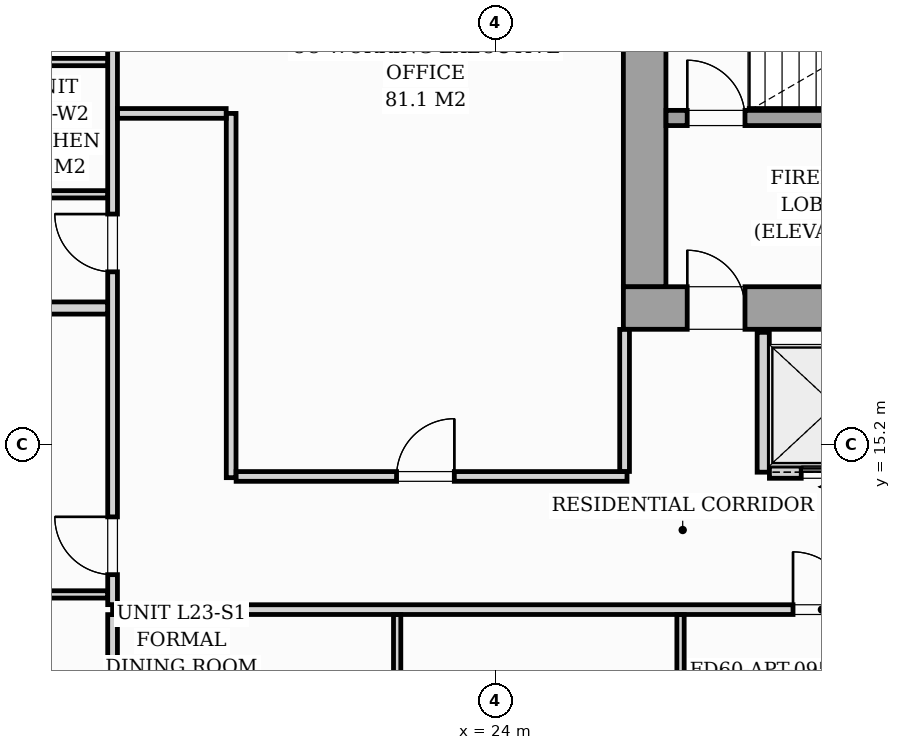
"""IFC4 building model, lengths in metres.
Left out: names, types, materials, properties, quantities, classifications, styles, units other than length and angle.
Written with IfcOpenShell. Run it as: python <this file> out.ifc"""

import sys

from ifc_helpers import new_model, si_unit, direction, frame, frame_2d, origin, origin_2d, place, context, subcontext, project, spatial, rectangle, i_section, extrude, source, transform, mapped, element, fill, save


model = new_model("IFC4")
c1 = context("Model", 3, precision=1e-05, world=origin(), true_north=direction((0.0, 1.0)))
c2 = subcontext(c1, "Body", "Model", "MODEL_VIEW")
j1 = project(units=[si_unit("LENGTHUNIT", "METRE"), si_unit("PLANEANGLEUNIT", "RADIAN")], contexts=[c1])
p1 = place(None, origin())
s1 = spatial("IfcSite", under=j1, at=p1, CompositionType="ELEMENT")
p2 = place(p1, origin())
s2 = spatial("IfcBuilding", under=s1, at=p2, CompositionType="ELEMENT")
p3 = place(p2, frame((0.0, 0.0, 84.2)))
s3 = spatial("IfcBuildingStorey", under=s2, at=p3, CompositionType="ELEMENT", Elevation=84.2)
m1 = source(origin(), c2, "Body", "SweptSolid", [
    extrude(i_section(OverallWidth=0.427, OverallDepth=0.483, WebThickness=0.051, FlangeThickness=0.082, FilletRadius=0.018, at=origin_2d()), origin(), (0.0, 0.0, 1.0), 3.196),
])
p4 = place(p3, frame((26.4, 17.4, 0.002), z_axis=(0.0, 0.0, 1.0), x_axis=(1.0, 0.0, 0.0)))
e1 = element("IfcColumn", 1, at=p4, inside=s3, PredefinedType="PILASTER", context=c2, shape_type="MappedRepresentation", body=[
    mapped(m1, transform((0.0, 0.0, 0.0), scale=1.0)),
])
p5 = place(p3, frame((26.1, 17.45, 0.0), z_axis=(0.0, 0.0, 1.0), x_axis=(1.0, 0.0, 0.0)))
e2 = element("IfcWall", 2, at=p5, inside=s3, PredefinedType="SHEAR", context=c2, shape_type="SweptSolid", body=[
    extrude(rectangle(XDim=19.8, YDim=0.7, at=frame_2d((9.9, 0.0))), origin(), (0.0, 0.0, 1.0), 3.2),
])
p6 = place(p5, frame((1.05, 0.0, 0.0)))
e3 = element("IfcOpeningElement", 3, at=p6, cuts=e2, PredefinedType="OPENING", context=c2, shape_type="SweptSolid", body=[
    extrude(rectangle(XDim=0.95, YDim=2.06, at=frame_2d((0.475, 1.03))), frame((0.0, 0.36, 0.0), z_axis=(0.0, -1.0, 0.0), x_axis=(1.0, 0.0, 0.0)), (0.0, 0.0, 1.0), 0.72),
])
p7 = place(p5, frame((9.48, 0.0, 0.0)))
e4 = element("IfcOpeningElement", 4, at=p7, cuts=e2, PredefinedType="OPENING", context=c2, shape_type="SweptSolid", body=[
    extrude(rectangle(XDim=0.85, YDim=2.0, at=frame_2d((0.425, 1.0))), frame((0.0, 0.36, 0.0), z_axis=(0.0, -1.0, 0.0), x_axis=(1.0, 0.0, 0.0)), (0.0, 0.0, 1.0), 0.72),
])
p8 = place(p5, frame((17.65, 0.0, 0.0)))
e5 = element("IfcOpeningElement", 5, at=p8, cuts=e2, PredefinedType="OPENING", context=c2, shape_type="SweptSolid", body=[
    extrude(rectangle(XDim=0.95, YDim=2.06, at=frame_2d((0.475, 1.03))), frame((0.0, 0.36, 0.0), z_axis=(0.0, -1.0, 0.0), x_axis=(1.0, 0.0, 0.0)), (0.0, 0.0, 1.0), 0.72),
])
p9 = place(p3, frame((26.45, 17.802, 0.0), z_axis=(0.0, 0.0, 1.0), x_axis=(0.0, 1.0, 0.0)))
e6 = element("IfcWall", 6, at=p9, inside=s3, PredefinedType="SHEAR", context=c2, shape_type="SweptSolid", body=[
    extrude(rectangle(XDim=5.796, YDim=0.7, at=frame_2d((2.898, 0.0))), origin(), (0.0, 0.0, 1.0), 3.2),
])
p10 = place(p3, frame((26.802, 20.575, 0.0), z_axis=(0.0, 0.0, 1.0), x_axis=(1.0, 0.0, 0.0)))
e7 = element("IfcWall", 7, at=p10, inside=s3, PredefinedType="SOLIDWALL", context=c2, shape_type="SweptSolid", body=[
    extrude(rectangle(XDim=8.148, YDim=0.25, at=frame_2d((4.074, 0.0))), origin(), (0.0, 0.0, 1.0), 3.2),
])
p11 = place(p10, frame((0.348, 0.0, 0.0)))
e8 = element("IfcOpeningElement", 8, at=p11, cuts=e7, PredefinedType="OPENING", context=c2, shape_type="SweptSolid", body=[
    extrude(rectangle(XDim=0.95, YDim=2.06, at=frame_2d((0.475, 1.03))), frame((0.0, 0.135, 0.0), z_axis=(0.0, -1.0, 0.0), x_axis=(1.0, 0.0, 0.0)), (0.0, 0.0, 1.0), 0.27),
])
p12 = place(p3, frame((28.4, 14.75, 0.0), z_axis=(0.0, 0.0, 1.0), x_axis=(0.0, 1.0, 0.0)))
e9 = element("IfcWall", 9, at=p12, inside=s3, PredefinedType="PARTITIONING", context=c2, shape_type="SweptSolid", body=[
    extrude(rectangle(XDim=2.3, YDim=0.2, at=frame_2d((1.15, 0.0))), origin(), (0.0, 0.0, 1.0), 2.94),
])
p13 = place(p3, frame((28.502, 14.75, 0.0), z_axis=(0.0, 0.0, 1.0), x_axis=(1.0, 0.0, 0.0)))
e10 = element("IfcWall", 10, at=p13, inside=s3, PredefinedType="PARTITIONING", context=c2, shape_type="SweptSolid", body=[
    extrude(rectangle(XDim=2.146, YDim=0.2, at=frame_2d((1.073, 0.0))), origin(), (0.0, 0.0, 1.0), 2.94),
])
p14 = place(p13, frame((0.523, 0.0, 0.0)))
e11 = element("IfcOpeningElement", 11, at=p14, cuts=e10, PredefinedType="OPENING", context=c2, shape_type="SweptSolid", body=[
    extrude(rectangle(XDim=1.05, YDim=2.08, at=frame_2d((0.525, 1.04))), frame((0.0, 0.11, 0.0), z_axis=(0.0, -1.0, 0.0), x_axis=(1.0, 0.0, 0.0)), (0.0, 0.0, 1.0), 0.22),
])
p15 = place(p3, frame((17.7, 12.49, 0.0), z_axis=(0.0, 0.0, 1.0), x_axis=(1.0, 0.0, 0.0)))
e12 = element("IfcWall", 12, at=p15, inside=s3, PredefinedType="PARTITIONING", context=c2, shape_type="SweptSolid", body=[
    extrude(rectangle(XDim=35.4, YDim=0.16, at=frame_2d((17.7, 0.0))), origin(), (0.0, 0.0, 1.0), 2.94),
])
p16 = place(p15, frame((11.19, 0.0, 0.0)))
e13 = element("IfcOpeningElement", 13, at=p16, cuts=e12, PredefinedType="OPENING", context=c2, shape_type="SweptSolid", body=[
    extrude(rectangle(XDim=0.95, YDim=2.06, at=frame_2d((0.475, 1.03))), frame((0.0, 0.09, 0.0), z_axis=(0.0, -1.0, 0.0), x_axis=(1.0, 0.0, 0.0)), (0.0, 0.0, 1.0), 0.18),
])
p17 = place(p15, frame((24.25, 0.0, 0.0)))
e14 = element("IfcOpeningElement", 14, at=p17, cuts=e12, PredefinedType="OPENING", context=c2, shape_type="SweptSolid", body=[
    extrude(rectangle(XDim=0.95, YDim=2.06, at=frame_2d((0.475, 1.03))), frame((0.0, 0.09, 0.0), z_axis=(0.0, -1.0, 0.0), x_axis=(1.0, 0.0, 0.0)), (0.0, 0.0, 1.0), 0.18),
])
p18 = place(p3, frame((17.7, 4.447, 0.0), z_axis=(0.0, 0.0, 1.0), x_axis=(0.0, 1.0, 0.0)))
e15 = element("IfcWall", 15, at=p18, inside=s3, PredefinedType="PARTITIONING", context=c2, shape_type="SweptSolid", body=[
    extrude(rectangle(XDim=7.961, YDim=0.16, at=frame_2d((3.98, 0.0))), origin(), (0.0, 0.0, 1.0), 2.94),
])
p19 = place(p3, frame((17.7, 12.572, 0.0), z_axis=(0.0, 0.0, 1.0), x_axis=(0.0, 1.0, 0.0)))
e16 = element("IfcWall", 16, at=p19, inside=s3, PredefinedType="PARTITIONING", context=c2, shape_type="SweptSolid", body=[
    extrude(rectangle(XDim=11.441, YDim=0.16, at=frame_2d((5.72, 0.0))), origin(), (0.0, 0.0, 1.0), 2.94),
])
p20 = place(p19, frame((0.493, 0.0, 0.0)))
e17 = element("IfcOpeningElement", 17, at=p20, cuts=e16, PredefinedType="OPENING", context=c2, shape_type="SweptSolid", body=[
    extrude(rectangle(XDim=0.95, YDim=2.06, at=frame_2d((0.475, 1.03))), frame((0.0, 0.09, 0.0), z_axis=(0.0, -1.0, 0.0), x_axis=(1.0, 0.0, 0.0)), (0.0, 0.0, 1.0), 0.18),
])
p21 = place(p19, frame((5.473, 0.0, 0.0)))
e18 = element("IfcOpeningElement", 18, at=p21, cuts=e16, PredefinedType="OPENING", context=c2, shape_type="SweptSolid", body=[
    extrude(rectangle(XDim=0.95, YDim=2.06, at=frame_2d((0.475, 1.03))), frame((0.0, 0.09, 0.0), z_axis=(0.0, -1.0, 0.0), x_axis=(1.0, 0.0, 0.0)), (0.0, 0.0, 1.0), 0.18),
])
p22 = place(p3, frame((22.38, 4.897, 0.0), z_axis=(0.0, 0.0, 1.0), x_axis=(0.0, 1.0, 0.0)))
e19 = element("IfcWall", 19, at=p22, inside=s3, PredefinedType="PARTITIONING", context=c2, shape_type="SweptSolid", body=[
    extrude(rectangle(XDim=7.511, YDim=0.12, at=frame_2d((3.755, 0.0))), origin(), (0.0, 0.0, 1.0), 2.94),
])
p23 = place(p22, frame((3.268, 0.0, 0.0)))
e20 = element("IfcOpeningElement", 20, at=p23, cuts=e19, PredefinedType="OPENING", context=c2, shape_type="SweptSolid", body=[
    extrude(rectangle(XDim=0.85, YDim=2.05, at=frame_2d((0.425, 1.025))), frame((0.0, 0.07, 0.0), z_axis=(0.0, -1.0, 0.0), x_axis=(1.0, 0.0, 0.0)), (0.0, 0.0, 1.0), 0.14),
])
p24 = place(p3, frame((27.04, 5.346, 0.0), z_axis=(0.0, 0.0, 1.0), x_axis=(0.0, 1.0, 0.0)))
e21 = element("IfcWall", 21, at=p24, inside=s3, PredefinedType="PARTITIONING", context=c2, shape_type="SweptSolid", body=[
    extrude(rectangle(XDim=7.062, YDim=0.12, at=frame_2d((3.531, 0.0))), origin(), (0.0, 0.0, 1.0), 2.216),
])
p25 = place(p24, frame((2.874, 0.0, 0.0)))
e22 = element("IfcOpeningElement", 22, at=p25, cuts=e21, PredefinedType="OPENING", context=c2, shape_type="SweptSolid", body=[
    extrude(rectangle(XDim=0.85, YDim=2.05, at=frame_2d((0.425, 1.025))), frame((0.0, 0.07, 0.0), z_axis=(0.0, -1.0, 0.0), x_axis=(1.0, 0.0, 0.0)), (0.0, 0.0, 1.0), 0.14),
])
p26 = place(p3, frame((9.232, 17.45, 0.0), z_axis=(0.0, 0.0, 1.0), x_axis=(1.0, 0.0, 0.0)))
e23 = element("IfcWall", 23, at=p26, inside=s3, PredefinedType="PARTITIONING", context=c2, shape_type="SweptSolid", body=[
    extrude(rectangle(XDim=8.386, YDim=0.2, at=frame_2d((4.193, 0.0))), origin(), (0.0, 0.0, 1.0), 2.94),
])
for number, where, z_axis, x_axis in (
    (24, (15.362, 12.74, 0.0), (0.0, 0.0, 1.0), (1.0, 0.0, 0.0)),
    (25, (15.362, 21.495, 0.0), (0.0, 0.0, 1.0), (1.0, 0.0, 0.0)),
    (26, (15.362, 19.32, 0.0), (0.0, 0.0, 1.0), (1.0, 0.0, 0.0)),
):
    element("IfcWall", number, at=place(p3, frame(where, z_axis=z_axis, x_axis=x_axis)), inside=s3, PredefinedType="PARTITIONING", context=c2, shape_type="SweptSolid", body=[
        extrude(rectangle(XDim=2.256, YDim=0.12, at=frame_2d((1.128, 0.0))), origin(), (0.0, 0.0, 1.0), 2.94),
    ])
p27 = place(p3, frame((19.65, 14.66, 0.0), z_axis=(0.0, 0.0, 1.0), x_axis=(0.0, 1.0, 0.0)))
e27 = element("IfcWall", 27, at=p27, inside=s3, PredefinedType="PARTITIONING", context=c2, shape_type="SweptSolid", body=[
    extrude(rectangle(XDim=5.99, YDim=0.16, at=frame_2d((2.995, 0.0))), origin(), (0.0, 0.0, 1.0), 2.94),
])
p28 = place(p3, frame((17.782, 20.65, 0.0), z_axis=(0.0, 0.0, 1.0), x_axis=(1.0, 0.0, 0.0)))
e28 = element("IfcWall", 28, at=p28, inside=s3, PredefinedType="PARTITIONING", context=c2, shape_type="SweptSolid", body=[
    extrude(rectangle(XDim=1.786, YDim=0.16, at=frame_2d((0.893, 0.0))), origin(), (0.0, 0.0, 1.0), 2.94),
])
p29 = place(p3, frame((19.732, 14.68, 0.0), z_axis=(0.0, 0.0, 1.0), x_axis=(1.0, 0.0, 0.0)))
e29 = element("IfcWall", 29, at=p29, inside=s3, PredefinedType="PARTITIONING", context=c2, shape_type="SweptSolid", body=[
    extrude(rectangle(XDim=6.428, YDim=0.16, at=frame_2d((3.214, 0.0))), origin(), (0.0, 0.0, 1.0), 2.94),
])
p30 = place(p29, frame((2.638, 0.0, 0.0)))
e30 = element("IfcOpeningElement", 30, at=p30, cuts=e29, PredefinedType="OPENING", context=c2, shape_type="SweptSolid", body=[
    extrude(rectangle(XDim=0.95, YDim=2.06, at=frame_2d((0.475, 1.03))), frame((0.0, 0.09, 0.0), z_axis=(0.0, -1.0, 0.0), x_axis=(1.0, 0.0, 0.0)), (0.0, 0.0, 1.0), 0.18),
])
p31 = place(p3, frame((26.12, 14.762, 0.0), z_axis=(0.0, 0.0, 1.0), x_axis=(0.0, 1.0, 0.0)))
e31 = element("IfcWall", 31, at=p31, inside=s3, PredefinedType="PARTITIONING", context=c2, shape_type="SweptSolid", body=[
    extrude(rectangle(XDim=2.336, YDim=0.16, at=frame_2d((1.168, 0.0))), origin(), (0.0, 0.0, 1.0), 2.94),
])
m2 = source(origin(), c2, "Body", "SweptSolid", [
    extrude(rectangle(XDim=0.95, YDim=2.06, at=frame_2d((0.475, 1.03))), frame((0.0, 0.025, 0.0), z_axis=(0.0, -1.0, 0.0), x_axis=(1.0, 0.0, 0.0)), (0.0, 0.0, 1.0), 0.05),
])
p32 = place(p6, origin())
e32 = element("IfcDoor", 32, at=p32, inside=s3, OperationType="SINGLE_SWING_LEFT", PredefinedType="DOOR", context=c2, shape_type="MappedRepresentation", body=[
    mapped(m2, transform((0.0, 0.0, 0.0), scale=1.0)),
])
fill(e3, e32)
p33 = place(p11, origin())
e33 = element("IfcDoor", 33, at=p33, inside=s3, OperationType="SINGLE_SWING_LEFT", PredefinedType="DOOR", context=c2, shape_type="MappedRepresentation", body=[
    mapped(m2, transform((0.0, 0.0, 0.0), scale=1.0)),
])
fill(e8, e33)
m3 = source(origin(), c2, "Body", "SweptSolid", [
    extrude(rectangle(XDim=1.05, YDim=2.08, at=frame_2d((0.525, 1.04))), frame((0.0, 0.025, 0.0), z_axis=(0.0, -1.0, 0.0), x_axis=(1.0, 0.0, 0.0)), (0.0, 0.0, 1.0), 0.05),
])
p34 = place(p14, origin())
e34 = element("IfcDoor", 34, at=p34, inside=s3, OperationType="SLIDING_TO_LEFT", PredefinedType="DOOR", context=c2, shape_type="MappedRepresentation", body=[
    mapped(m3, transform((0.0, 0.0, 0.0), scale=1.0)),
])
fill(e11, e34)
m4 = source(origin(), c2, "Body", "SweptSolid", [
    extrude(rectangle(XDim=0.95, YDim=2.06, at=frame_2d((0.475, 1.03))), frame((0.0, 0.025, 0.0), z_axis=(0.0, -1.0, 0.0), x_axis=(1.0, 0.0, 0.0)), (0.0, 0.0, 1.0), 0.05),
])
p35 = place(p16, origin())
e35 = element("IfcDoor", 35, at=p35, inside=s3, OperationType="SINGLE_SWING_LEFT", PredefinedType="DOOR", context=c2, shape_type="MappedRepresentation", body=[
    mapped(m4, transform((0.0, 0.0, 0.0), scale=1.0)),
])
fill(e13, e35)
p36 = place(p20, origin())
e36 = element("IfcDoor", 36, at=p36, inside=s3, OperationType="SINGLE_SWING_RIGHT", PredefinedType="DOOR", context=c2, shape_type="MappedRepresentation", body=[
    mapped(m4, transform((0.0, 0.0, 0.0), scale=1.0)),
])
fill(e17, e36)
p37 = place(p21, origin())
e37 = element("IfcDoor", 37, at=p37, inside=s3, OperationType="SINGLE_SWING_RIGHT", PredefinedType="DOOR", context=c2, shape_type="MappedRepresentation", body=[
    mapped(m4, transform((0.0, 0.0, 0.0), scale=1.0)),
])
fill(e18, e37)
p38 = place(p30, origin())
e38 = element("IfcDoor", 38, at=p38, inside=s3, OperationType="SINGLE_SWING_RIGHT", PredefinedType="DOOR", context=c2, shape_type="MappedRepresentation", body=[
    mapped(m4, transform((0.0, 0.0, 0.0), scale=1.0)),
])
fill(e30, e38)
save(model, sys.argv[1])
